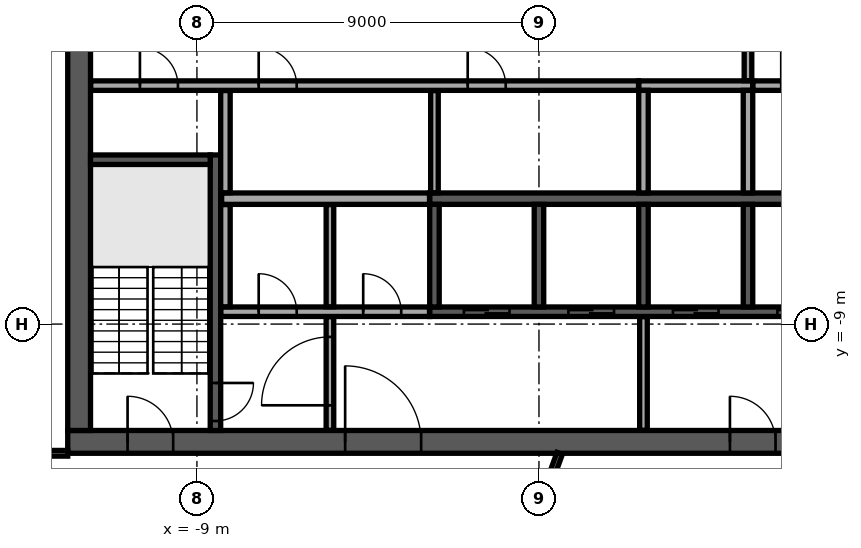
"""IFC4 building model, lengths in metres.
Left out: names, types, materials, properties, quantities, classifications, styles, units other than length and angle.
Written with IfcOpenShell. Run it as: python <this file> out.ifc"""

import sys

from ifc_helpers import new_model, si_unit, direction, frame, frame_2d, origin, place, context, subcontext, project, spatial, rectangle, extrude, element, fill, save


model = new_model("IFC4")
c1 = context("Model", 3, precision=1e-05, world=origin(), true_north=direction((0.0, 1.0)))
c2 = subcontext(c1, "Body", "Model", "MODEL_VIEW")
j1 = project(units=[si_unit("LENGTHUNIT", "METRE"), si_unit("PLANEANGLEUNIT", "RADIAN")], contexts=[c1])
p1 = place(None, origin())
s1 = spatial("IfcSite", under=j1, at=p1, CompositionType="ELEMENT")
p2 = place(p1, origin())
s2 = spatial("IfcBuilding", under=s1, at=p2, CompositionType="ELEMENT")
p3 = place(p2, frame((0.0, 0.0, 304.5)))
s3 = spatial("IfcBuildingStorey", under=s2, at=p3, CompositionType="ELEMENT", Elevation=304.5)
p4 = place(p3, frame((-12.4, -12.1, 0.0), z_axis=(0.0, 0.0, 1.0), x_axis=(1.0, 0.0, 0.0)))
e1 = element("IfcWall", 1, at=p4, inside=s3, PredefinedType="SHEAR", context=c2, shape_type="SweptSolid", body=[
    extrude(rectangle(XDim=24.8, YDim=0.6, at=frame_2d((12.4, 0.0))), origin(), (0.0, 0.0, 1.0), 3.65),
])
p5 = place(p4, frame((7.3, 0.0, 0.0)))
e2 = element("IfcOpeningElement", 2, at=p5, cuts=e1, PredefinedType="OPENING", context=c2, shape_type="SweptSolid", body=[
    extrude(rectangle(XDim=2.0, YDim=2.1, at=frame_2d((1.0, 1.05))), frame((0.0, 0.31, 0.0), z_axis=(0.0, -1.0, 0.0), x_axis=(1.0, 0.0, 0.0)), (0.0, 0.0, 1.0), 0.62),
])
p6 = place(p4, frame((17.425, 0.0, 0.0)))
e3 = element("IfcOpeningElement", 3, at=p6, cuts=e1, PredefinedType="OPENING", context=c2, shape_type="SweptSolid", body=[
    extrude(rectangle(XDim=1.2, YDim=2.1, at=frame_2d((0.6, 1.05))), frame((0.0, 0.31, 0.0), z_axis=(0.0, -1.0, 0.0), x_axis=(1.0, 0.0, 0.0)), (0.0, 0.0, 1.0), 0.62),
])
p7 = place(p4, frame((1.575, 0.0, 0.0)))
e4 = element("IfcOpeningElement", 4, at=p7, cuts=e1, PredefinedType="OPENING", context=c2, shape_type="SweptSolid", body=[
    extrude(rectangle(XDim=1.2, YDim=2.1, at=frame_2d((0.6, 1.05))), frame((0.0, 0.31, 0.0), z_axis=(0.0, -1.0, 0.0), x_axis=(1.0, 0.0, 0.0)), (0.0, 0.0, 1.0), 0.62),
])
p8 = place(p4, frame((22.025, 0.0, 0.0)))
e5 = element("IfcOpeningElement", 5, at=p8, cuts=e1, PredefinedType="OPENING", context=c2, shape_type="SweptSolid", body=[
    extrude(rectangle(XDim=1.2, YDim=2.1, at=frame_2d((0.6, 1.05))), frame((0.0, 0.31, 0.0), z_axis=(0.0, -1.0, 0.0), x_axis=(1.0, 0.0, 0.0)), (0.0, 0.0, 1.0), 0.62),
])
p9 = place(p3, frame((-12.1, -11.8, 0.0), z_axis=(0.0, 0.0, 1.0), x_axis=(0.0, 1.0, 0.0)))
e6 = element("IfcWall", 6, at=p9, inside=s3, PredefinedType="SHEAR", context=c2, shape_type="SweptSolid", body=[
    extrude(rectangle(XDim=23.6, YDim=0.6, at=frame_2d((11.8, 0.0))), origin(), (0.0, 0.0, 1.0), 3.65),
])
p10 = place(p9, frame((10.6, 0.0, 0.0)))
e7 = element("IfcOpeningElement", 7, at=p10, cuts=e6, PredefinedType="OPENING", context=c2, shape_type="SweptSolid", body=[
    extrude(rectangle(XDim=2.4, YDim=2.4, at=frame_2d((1.2, 1.2))), frame((0.0, 0.31, 0.0), z_axis=(0.0, -1.0, 0.0), x_axis=(1.0, 0.0, 0.0)), (0.0, 0.0, 1.0), 0.62),
])
p11 = place(p3, frame((-2.875, -5.7, 0.0), z_axis=(0.0, 0.0, 1.0), x_axis=(1.0, 0.0, 0.0)))
e8 = element("IfcWall", 8, at=p11, inside=s3, PredefinedType="SOLIDWALL", context=c2, shape_type="SweptSolid", body=[
    extrude(rectangle(XDim=11.25, YDim=0.3, at=frame_2d((5.625, 0.0))), origin(), (0.0, 0.0, 1.0), 3.65),
])
p12 = place(p3, frame((2.625, -2.725, 0.0), z_axis=(0.0, 0.0, 1.0), x_axis=(1.0, 0.0, 0.0)))
e9 = element("IfcWall", 9, at=p12, inside=s3, PredefinedType="SOLIDWALL", context=c2, shape_type="SweptSolid", body=[
    extrude(rectangle(XDim=3.0, YDim=0.25, at=frame_2d((1.5, 0.0))), origin(), (0.0, 0.0, 1.0), 3.65),
])
for number, where, z_axis, x_axis in (
    (10, (2.75, -5.55, 0.0), (0.0, 0.0, 1.0), (0.0, 1.0, 0.0)),
    (11, (5.5, -5.55, 0.0), (0.0, 0.0, 1.0), (0.0, 1.0, 0.0)),
):
    element("IfcWall", number, at=place(p3, frame(where, z_axis=z_axis, x_axis=x_axis)), inside=s3, PredefinedType="SOLIDWALL", context=c2, shape_type="SweptSolid", body=[
        extrude(rectangle(XDim=2.7, YDim=0.25, at=frame_2d((1.35, 0.0))), origin(), (0.0, 0.0, 1.0), 3.65),
    ])
p13 = place(p3, frame((-2.875, -8.675, 0.0), z_axis=(0.0, 0.0, 1.0), x_axis=(1.0, 0.0, 0.0)))
e12 = element("IfcWall", 12, at=p13, inside=s3, PredefinedType="SOLIDWALL", context=c2, shape_type="SweptSolid", body=[
    extrude(rectangle(XDim=11.25, YDim=0.25, at=frame_2d((5.625, 0.0))), origin(), (0.0, 0.0, 1.0), 3.65),
])
p14 = place(p13, frame((0.9, 0.0, 0.0)))
e13 = element("IfcOpeningElement", 13, at=p14, cuts=e12, PredefinedType="OPENING", context=c2, shape_type="SweptSolid", body=[
    extrude(rectangle(XDim=1.2, YDim=2.1, at=frame_2d((0.6, 1.05))), frame((0.0, 0.135, 0.0), z_axis=(0.0, -1.0, 0.0), x_axis=(1.0, 0.0, 0.0)), (0.0, 0.0, 1.0), 0.27),
])
p15 = place(p13, frame((3.65, 0.0, 0.0)))
e14 = element("IfcOpeningElement", 14, at=p15, cuts=e12, PredefinedType="OPENING", context=c2, shape_type="SweptSolid", body=[
    extrude(rectangle(XDim=1.2, YDim=2.1, at=frame_2d((0.6, 1.05))), frame((0.0, 0.135, 0.0), z_axis=(0.0, -1.0, 0.0), x_axis=(1.0, 0.0, 0.0)), (0.0, 0.0, 1.0), 0.27),
])
p16 = place(p13, frame((6.4, 0.0, 0.0)))
e15 = element("IfcOpeningElement", 15, at=p16, cuts=e12, PredefinedType="OPENING", context=c2, shape_type="SweptSolid", body=[
    extrude(rectangle(XDim=1.2, YDim=2.1, at=frame_2d((0.6, 1.05))), frame((0.0, 0.135, 0.0), z_axis=(0.0, -1.0, 0.0), x_axis=(1.0, 0.0, 0.0)), (0.0, 0.0, 1.0), 0.27),
])
p17 = place(p13, frame((9.15, 0.0, 0.0)))
e16 = element("IfcOpeningElement", 16, at=p17, cuts=e12, PredefinedType="OPENING", context=c2, shape_type="SweptSolid", body=[
    extrude(rectangle(XDim=1.2, YDim=2.1, at=frame_2d((0.6, 1.05))), frame((0.0, 0.135, 0.0), z_axis=(0.0, -1.0, 0.0), x_axis=(1.0, 0.0, 0.0)), (0.0, 0.0, 1.0), 0.27),
])
for number, where, z_axis, x_axis in (
    (17, (-2.75, -8.55, 0.0), (0.0, 0.0, 1.0), (0.0, 1.0, 0.0)),
    (18, (0.0, -8.55, 0.0), (0.0, 0.0, 1.0), (0.0, 1.0, 0.0)),
    (19, (2.75, -8.55, 0.0), (0.0, 0.0, 1.0), (0.0, 1.0, 0.0)),
    (20, (5.5, -8.55, 0.0), (0.0, 0.0, 1.0), (0.0, 1.0, 0.0)),
):
    element("IfcWall", number, at=place(p3, frame(where, z_axis=z_axis, x_axis=x_axis)), inside=s3, PredefinedType="SOLIDWALL", context=c2, shape_type="SweptSolid", body=[
        extrude(rectangle(XDim=2.7, YDim=0.25, at=frame_2d((1.35, 0.0))), origin(), (0.0, 0.0, 1.0), 3.65),
    ])
p18 = place(p3, frame((-8.512, -4.55, 0.0), z_axis=(0.0, 0.0, 1.0), x_axis=(0.0, -1.0, 0.0)))
e21 = element("IfcWall", 21, at=p18, inside=s3, PredefinedType="SOLIDWALL", context=c2, shape_type="SweptSolid", body=[
    extrude(rectangle(XDim=7.25, YDim=0.275, at=frame_2d((3.625, 0.0))), origin(), (0.0, 0.0, 1.0), 3.65),
])
p19 = place(p18, frame((6.0, 0.0, 0.0)))
e22 = element("IfcOpeningElement", 22, at=p19, cuts=e21, PredefinedType="OPENING", context=c2, shape_type="SweptSolid", body=[
    extrude(rectangle(XDim=1.0, YDim=2.1, at=frame_2d((0.5, 1.05))), frame((0.0, 0.147, 0.0), z_axis=(0.0, -1.0, 0.0), x_axis=(1.0, 0.0, 0.0)), (0.0, 0.0, 1.0), 0.295),
])
p20 = place(p3, frame((-8.65, -4.675, 0.0), z_axis=(0.0, 0.0, 1.0), x_axis=(-1.0, 0.0, 0.0)))
e23 = element("IfcWall", 23, at=p20, inside=s3, PredefinedType="SOLIDWALL", context=c2, shape_type="SweptSolid", body=[
    extrude(rectangle(XDim=3.15, YDim=0.25, at=frame_2d((1.575, 0.0))), origin(), (0.0, 0.0, 1.0), 3.65),
])
p21 = place(p3, frame((-5.5, -11.795, 0.0), z_axis=(0.0, 0.0, 1.0), x_axis=(0.0, 1.0, 0.0)))
e24 = element("IfcWall", 24, at=p21, inside=s3, PredefinedType="PARTITIONING", context=c2, shape_type="SweptSolid", body=[
    extrude(rectangle(XDim=2.99, YDim=0.2, at=frame_2d((1.495, 0.0))), origin(), (0.0, 0.0, 1.0), 3.65),
])
p22 = place(p21, frame((0.657, 0.0, 0.0)))
e25 = element("IfcOpeningElement", 25, at=p22, cuts=e24, PredefinedType="OPENING", context=c2, shape_type="SweptSolid", body=[
    extrude(rectangle(XDim=1.8, YDim=2.1, at=frame_2d((0.9, 1.05))), frame((0.0, 0.11, 0.0), z_axis=(0.0, -1.0, 0.0), x_axis=(1.0, 0.0, 0.0)), (0.0, 0.0, 1.0), 0.22),
])
p23 = place(p3, frame((2.75, -11.795, 0.0), z_axis=(0.0, 0.0, 1.0), x_axis=(0.0, 1.0, 0.0)))
e26 = element("IfcWall", 26, at=p23, inside=s3, PredefinedType="PARTITIONING", context=c2, shape_type="SweptSolid", body=[
    extrude(rectangle(XDim=2.99, YDim=0.2, at=frame_2d((1.495, 0.0))), origin(), (0.0, 0.0, 1.0), 3.65),
])
p24 = place(p3, frame((-8.37, -8.675, 0.0), z_axis=(0.0, 0.0, 1.0), x_axis=(1.0, 0.0, 0.0)))
e27 = element("IfcWall", 27, at=p24, inside=s3, PredefinedType="PARTITIONING", context=c2, shape_type="SweptSolid", body=[
    extrude(rectangle(XDim=5.49, YDim=0.25, at=frame_2d((2.745, 0.0))), origin(), (0.0, 0.0, 1.0), 3.65),
])
p25 = place(p24, frame((0.995, 0.0, 0.0)))
e28 = element("IfcOpeningElement", 28, at=p25, cuts=e27, PredefinedType="OPENING", context=c2, shape_type="SweptSolid", body=[
    extrude(rectangle(XDim=1.0, YDim=2.1, at=frame_2d((0.5, 1.05))), frame((0.0, 0.135, 0.0), z_axis=(0.0, -1.0, 0.0), x_axis=(1.0, 0.0, 0.0)), (0.0, 0.0, 1.0), 0.27),
])
p26 = place(p24, frame((3.745, 0.0, 0.0)))
e29 = element("IfcOpeningElement", 29, at=p26, cuts=e27, PredefinedType="OPENING", context=c2, shape_type="SweptSolid", body=[
    extrude(rectangle(XDim=1.0, YDim=2.1, at=frame_2d((0.5, 1.05))), frame((0.0, 0.135, 0.0), z_axis=(0.0, -1.0, 0.0), x_axis=(1.0, 0.0, 0.0)), (0.0, 0.0, 1.0), 0.27),
])
p27 = place(p3, frame((-8.25, -8.545, 0.0), z_axis=(0.0, 0.0, 1.0), x_axis=(0.0, 1.0, 0.0)))
e30 = element("IfcWall", 30, at=p27, inside=s3, PredefinedType="PARTITIONING", context=c2, shape_type="SweptSolid", body=[
    extrude(rectangle(XDim=2.69, YDim=0.25, at=frame_2d((1.345, 0.0))), origin(), (0.0, 0.0, 1.0), 3.65),
])
p28 = place(p3, frame((-5.5, -8.545, 0.0), z_axis=(0.0, 0.0, 1.0), x_axis=(0.0, 1.0, 0.0)))
e31 = element("IfcWall", 31, at=p28, inside=s3, PredefinedType="PARTITIONING", context=c2, shape_type="SweptSolid", body=[
    extrude(rectangle(XDim=2.69, YDim=0.2, at=frame_2d((1.345, 0.0))), origin(), (0.0, 0.0, 1.0), 3.65),
])
p29 = place(p3, frame((-8.35, -5.7, 0.0), z_axis=(0.0, 0.0, 1.0), x_axis=(1.0, 0.0, 0.0)))
e32 = element("IfcWall", 32, at=p29, inside=s3, PredefinedType="PARTITIONING", context=c2, shape_type="SweptSolid", body=[
    extrude(rectangle(XDim=5.47, YDim=0.3, at=frame_2d((2.735, 0.0))), origin(), (0.0, 0.0, 1.0), 3.65),
])
p30 = place(p3, frame((-8.25, -5.545, 0.0), z_axis=(0.0, 0.0, 1.0), x_axis=(0.0, 1.0, 0.0)))
e33 = element("IfcWall", 33, at=p30, inside=s3, PredefinedType="PARTITIONING", context=c2, shape_type="SweptSolid", body=[
    extrude(rectangle(XDim=2.69, YDim=0.25, at=frame_2d((1.345, 0.0))), origin(), (0.0, 0.0, 1.0), 3.65),
])
p31 = place(p3, frame((-2.75, -5.545, 0.0), z_axis=(0.0, 0.0, 1.0), x_axis=(0.0, 1.0, 0.0)))
e34 = element("IfcWall", 34, at=p31, inside=s3, PredefinedType="PARTITIONING", context=c2, shape_type="SweptSolid", body=[
    extrude(rectangle(XDim=2.69, YDim=0.2, at=frame_2d((1.345, 0.0))), origin(), (0.0, 0.0, 1.0), 3.65),
])
p32 = place(p3, frame((-11.795, -2.725, 0.0), z_axis=(0.0, 0.0, 1.0), x_axis=(1.0, 0.0, 0.0)))
e35 = element("IfcWall", 35, at=p32, inside=s3, PredefinedType="PARTITIONING", context=c2, shape_type="SweptSolid", body=[
    extrude(rectangle(XDim=14.415, YDim=0.25, at=frame_2d((7.208, 0.0))), origin(), (0.0, 0.0, 1.0), 3.65),
])
p33 = place(p32, frame((1.295, 0.0, 0.0)))
e36 = element("IfcOpeningElement", 36, at=p33, cuts=e35, PredefinedType="OPENING", context=c2, shape_type="SweptSolid", body=[
    extrude(rectangle(XDim=1.0, YDim=2.1, at=frame_2d((0.5, 1.05))), frame((0.0, 0.135, 0.0), z_axis=(0.0, -1.0, 0.0), x_axis=(1.0, 0.0, 0.0)), (0.0, 0.0, 1.0), 0.27),
])
p34 = place(p32, frame((4.42, 0.0, 0.0)))
e37 = element("IfcOpeningElement", 37, at=p34, cuts=e35, PredefinedType="OPENING", context=c2, shape_type="SweptSolid", body=[
    extrude(rectangle(XDim=1.0, YDim=2.1, at=frame_2d((0.5, 1.05))), frame((0.0, 0.135, 0.0), z_axis=(0.0, -1.0, 0.0), x_axis=(1.0, 0.0, 0.0)), (0.0, 0.0, 1.0), 0.27),
])
p35 = place(p32, frame((9.92, 0.0, 0.0)))
e38 = element("IfcOpeningElement", 38, at=p35, cuts=e35, PredefinedType="OPENING", context=c2, shape_type="SweptSolid", body=[
    extrude(rectangle(XDim=1.0, YDim=2.1, at=frame_2d((0.5, 1.05))), frame((0.0, 0.135, 0.0), z_axis=(0.0, -1.0, 0.0), x_axis=(1.0, 0.0, 0.0)), (0.0, 0.0, 1.0), 0.27),
])
p36 = place(p3, frame((5.63, -2.725, 0.0), z_axis=(0.0, 0.0, 1.0), x_axis=(1.0, 0.0, 0.0)))
e39 = element("IfcWall", 39, at=p36, inside=s3, PredefinedType="PARTITIONING", context=c2, shape_type="SweptSolid", body=[
    extrude(rectangle(XDim=6.165, YDim=0.25, at=frame_2d((3.083, 0.0))), origin(), (0.0, 0.0, 1.0), 3.65),
])
p37 = place(p36, frame((0.745, 0.0, 0.0)))
e40 = element("IfcOpeningElement", 40, at=p37, cuts=e39, PredefinedType="OPENING", context=c2, shape_type="SweptSolid", body=[
    extrude(rectangle(XDim=1.0, YDim=2.1, at=frame_2d((0.5, 1.05))), frame((0.0, 0.135, 0.0), z_axis=(0.0, -1.0, 0.0), x_axis=(1.0, 0.0, 0.0)), (0.0, 0.0, 1.0), 0.27),
])
p38 = place(p36, frame((3.92, 0.0, 0.0)))
e41 = element("IfcOpeningElement", 41, at=p38, cuts=e39, PredefinedType="OPENING", context=c2, shape_type="SweptSolid", body=[
    extrude(rectangle(XDim=0.9, YDim=2.1, at=frame_2d((0.45, 1.05))), frame((0.0, 0.135, 0.0), z_axis=(0.0, -1.0, 0.0), x_axis=(1.0, 0.0, 0.0)), (0.0, 0.0, 1.0), 0.27),
])
p39 = place(p3, frame((5.5, -2.595, 0.0), z_axis=(0.0, 0.0, 1.0), x_axis=(0.0, 1.0, 0.0)))
e42 = element("IfcWall", 42, at=p39, inside=s3, PredefinedType="PARTITIONING", context=c2, shape_type="SweptSolid", body=[
    extrude(rectangle(XDim=5.19, YDim=0.2, at=frame_2d((2.595, 0.0))), origin(), (0.0, 0.0, 1.0), 3.65),
])
p40 = place(p39, frame((1.395, 0.0, 0.0)))
e43 = element("IfcOpeningElement", 43, at=p40, cuts=e42, PredefinedType="OPENING", context=c2, shape_type="SweptSolid", body=[
    extrude(rectangle(XDim=2.4, YDim=2.4, at=frame_2d((1.2, 1.2))), frame((0.0, 0.11, 0.0), z_axis=(0.0, -1.0, 0.0), x_axis=(1.0, 0.0, 0.0)), (0.0, 0.0, 1.0), 0.22),
])
p41 = place(p3, frame((-24.679, -11.445, 0.0), z_axis=(0.0, 0.0, 1.0), x_axis=(0.939685239834, -0.342040421645, 0.0)))
e44 = element("IfcWall", 44, at=p41, inside=s3, PredefinedType="PARTITIONING", context=c2, shape_type="SweptSolid", body=[
    extrude(rectangle(XDim=38.628, YDim=0.15, at=frame_2d((19.314, 0.0))), origin(), (0.0, 0.0, 1.0), 3.25),
])
p42 = place(p41, frame((8.764, 0.0, 0.0)))
e45 = element("IfcOpeningElement", 45, at=p42, cuts=e44, PredefinedType="OPENING", context=c2, shape_type="SweptSolid", body=[
    extrude(rectangle(XDim=1.0, YDim=2.1, at=frame_2d((0.5, 1.05))), frame((0.0, 0.085, 0.0), z_axis=(0.0, -1.0, 0.0), x_axis=(1.0, 0.0, 0.0)), (0.0, 0.0, 1.0), 0.17),
])
p43 = place(p41, frame((19.503, 0.0, 0.0)))
e46 = element("IfcOpeningElement", 46, at=p43, cuts=e44, PredefinedType="OPENING", context=c2, shape_type="SweptSolid", body=[
    extrude(rectangle(XDim=1.0, YDim=2.1, at=frame_2d((0.5, 1.05))), frame((0.0, 0.085, 0.0), z_axis=(0.0, -1.0, 0.0), x_axis=(1.0, 0.0, 0.0)), (0.0, 0.0, 1.0), 0.17),
])
p44 = place(p41, frame((29.163, 0.0, 0.0)))
e47 = element("IfcOpeningElement", 47, at=p44, cuts=e44, PredefinedType="OPENING", context=c2, shape_type="SweptSolid", body=[
    extrude(rectangle(XDim=1.0, YDim=2.1, at=frame_2d((0.5, 1.05))), frame((0.0, 0.085, 0.0), z_axis=(0.0, -1.0, 0.0), x_axis=(1.0, 0.0, 0.0)), (0.0, 0.0, 1.0), 0.17),
])
p45 = place(p3, frame((-14.604, -12.558, 0.0), z_axis=(0.0, 0.0, 1.0), x_axis=(0.93968732693, -0.342034687724, 0.0)))
e48 = element("IfcWall", 48, at=p45, inside=s3, PredefinedType="PARTITIONING", context=c2, shape_type="SweptSolid", body=[
    extrude(rectangle(XDim=14.182, YDim=0.15, at=frame_2d((7.091, 0.0))), origin(), (0.0, 0.0, 1.0), 3.25),
])
p46 = place(p3, frame((-14.576, -12.4, 0.0), z_axis=(0.0, 0.0, 1.0), x_axis=(1.0, 0.0, 0.0)))
e49 = element("IfcWall", 49, at=p46, inside=s3, PredefinedType="PARTITIONING", context=c2, shape_type="SweptSolid", body=[
    extrude(rectangle(XDim=2.176, YDim=0.15, at=frame_2d((1.088, 0.0))), origin(), (0.0, 0.0, 1.0), 3.13),
])
p47 = place(p3, frame((-1.251, -17.338, 0.0), z_axis=(0.0, 0.0, 1.0), x_axis=(0.341963126629, 0.939713371207, 0.0)))
e50 = element("IfcWall", 50, at=p47, inside=s3, PredefinedType="PARTITIONING", context=c2, shape_type="SweptSolid", body=[
    extrude(rectangle(XDim=5.255, YDim=0.15, at=frame_2d((2.628, 0.0))), origin(), (0.0, 0.0, 1.0), 3.65),
])
p48 = place(p47, frame((2.3, 0.0, 0.0)))
e51 = element("IfcOpeningElement", 51, at=p48, cuts=e50, PredefinedType="OPENING", context=c2, shape_type="SweptSolid", body=[
    extrude(rectangle(XDim=1.0, YDim=2.1, at=frame_2d((0.5, 1.05))), frame((0.0, 0.085, 0.0), z_axis=(0.0, -1.0, 0.0), x_axis=(1.0, 0.0, 0.0)), (0.0, 0.0, 1.0), 0.17),
])
p49 = place(p5, origin())
e52 = element("IfcDoor", 52, at=p49, inside=s3, OperationType="SINGLE_SWING_LEFT", PredefinedType="DOOR", context=c2, shape_type="SweptSolid", body=[
    extrude(rectangle(XDim=2.0, YDim=2.1, at=frame_2d((1.0, 1.05))), frame((0.0, 0.025, 0.0), z_axis=(0.0, -1.0, 0.0), x_axis=(1.0, 0.0, 0.0)), (0.0, 0.0, 1.0), 0.05),
])
fill(e2, e52)
p50 = place(p6, origin())
e53 = element("IfcDoor", 53, at=p50, inside=s3, OperationType="SINGLE_SWING_LEFT", PredefinedType="DOOR", context=c2, shape_type="SweptSolid", body=[
    extrude(rectangle(XDim=1.2, YDim=2.1, at=frame_2d((0.6, 1.05))), frame((0.0, 0.025, 0.0), z_axis=(0.0, -1.0, 0.0), x_axis=(1.0, 0.0, 0.0)), (0.0, 0.0, 1.0), 0.05),
])
fill(e3, e53)
p51 = place(p7, origin())
e54 = element("IfcDoor", 54, at=p51, inside=s3, OperationType="SINGLE_SWING_LEFT", PredefinedType="DOOR", context=c2, shape_type="SweptSolid", body=[
    extrude(rectangle(XDim=1.2, YDim=2.1, at=frame_2d((0.6, 1.05))), frame((0.0, 0.025, 0.0), z_axis=(0.0, -1.0, 0.0), x_axis=(1.0, 0.0, 0.0)), (0.0, 0.0, 1.0), 0.05),
])
fill(e4, e54)
p52 = place(p14, origin())
e55 = element("IfcDoor", 55, at=p52, inside=s3, OperationType="DOUBLE_DOOR_SLIDING", PredefinedType="DOOR", context=c2, shape_type="SweptSolid", body=[
    extrude(rectangle(XDim=1.2, YDim=2.1, at=frame_2d((0.6, 1.05))), frame((0.0, 0.025, 0.0), z_axis=(0.0, -1.0, 0.0), x_axis=(1.0, 0.0, 0.0)), (0.0, 0.0, 1.0), 0.05),
])
fill(e13, e55)
p53 = place(p15, origin())
e56 = element("IfcDoor", 56, at=p53, inside=s3, OperationType="DOUBLE_DOOR_SLIDING", PredefinedType="DOOR", context=c2, shape_type="SweptSolid", body=[
    extrude(rectangle(XDim=1.2, YDim=2.1, at=frame_2d((0.6, 1.05))), frame((0.0, 0.025, 0.0), z_axis=(0.0, -1.0, 0.0), x_axis=(1.0, 0.0, 0.0)), (0.0, 0.0, 1.0), 0.05),
])
fill(e14, e56)
p54 = place(p16, origin())
e57 = element("IfcDoor", 57, at=p54, inside=s3, OperationType="DOUBLE_DOOR_SLIDING", PredefinedType="DOOR", context=c2, shape_type="SweptSolid", body=[
    extrude(rectangle(XDim=1.2, YDim=2.1, at=frame_2d((0.6, 1.05))), frame((0.0, 0.025, 0.0), z_axis=(0.0, -1.0, 0.0), x_axis=(1.0, 0.0, 0.0)), (0.0, 0.0, 1.0), 0.05),
])
fill(e15, e57)
p55 = place(p17, origin())
e58 = element("IfcDoor", 58, at=p55, inside=s3, OperationType="DOUBLE_DOOR_SLIDING", PredefinedType="DOOR", context=c2, shape_type="SweptSolid", body=[
    extrude(rectangle(XDim=1.2, YDim=2.1, at=frame_2d((0.6, 1.05))), frame((0.0, 0.025, 0.0), z_axis=(0.0, -1.0, 0.0), x_axis=(1.0, 0.0, 0.0)), (0.0, 0.0, 1.0), 0.05),
])
fill(e16, e58)
p56 = place(p19, origin())
e59 = element("IfcDoor", 59, at=p56, inside=s3, OperationType="SINGLE_SWING_LEFT", PredefinedType="DOOR", context=c2, shape_type="SweptSolid", body=[
    extrude(rectangle(XDim=1.0, YDim=2.1, at=frame_2d((0.5, 1.05))), frame((0.0, 0.025, 0.0), z_axis=(0.0, -1.0, 0.0), x_axis=(1.0, 0.0, 0.0)), (0.0, 0.0, 1.0), 0.05),
])
fill(e22, e59)
p57 = place(p25, origin())
e60 = element("IfcDoor", 60, at=p57, inside=s3, OperationType="SINGLE_SWING_LEFT", PredefinedType="DOOR", context=c2, shape_type="SweptSolid", body=[
    extrude(rectangle(XDim=1.0, YDim=2.1, at=frame_2d((0.5, 1.05))), frame((0.0, 0.025, 0.0), z_axis=(0.0, -1.0, 0.0), x_axis=(1.0, 0.0, 0.0)), (0.0, 0.0, 1.0), 0.05),
])
fill(e28, e60)
p58 = place(p26, origin())
e61 = element("IfcDoor", 61, at=p58, inside=s3, OperationType="SINGLE_SWING_LEFT", PredefinedType="DOOR", context=c2, shape_type="SweptSolid", body=[
    extrude(rectangle(XDim=1.0, YDim=2.1, at=frame_2d((0.5, 1.05))), frame((0.0, 0.025, 0.0), z_axis=(0.0, -1.0, 0.0), x_axis=(1.0, 0.0, 0.0)), (0.0, 0.0, 1.0), 0.05),
])
fill(e29, e61)
p59 = place(p33, origin())
e62 = element("IfcDoor", 62, at=p59, inside=s3, OperationType="SINGLE_SWING_LEFT", PredefinedType="DOOR", context=c2, shape_type="SweptSolid", body=[
    extrude(rectangle(XDim=1.0, YDim=2.1, at=frame_2d((0.5, 1.05))), frame((0.0, 0.025, 0.0), z_axis=(0.0, -1.0, 0.0), x_axis=(1.0, 0.0, 0.0)), (0.0, 0.0, 1.0), 0.05),
])
fill(e36, e62)
p60 = place(p34, origin())
e63 = element("IfcDoor", 63, at=p60, inside=s3, OperationType="SINGLE_SWING_LEFT", PredefinedType="DOOR", context=c2, shape_type="SweptSolid", body=[
    extrude(rectangle(XDim=1.0, YDim=2.1, at=frame_2d((0.5, 1.05))), frame((0.0, 0.025, 0.0), z_axis=(0.0, -1.0, 0.0), x_axis=(1.0, 0.0, 0.0)), (0.0, 0.0, 1.0), 0.05),
])
fill(e37, e63)
p61 = place(p35, origin())
e64 = element("IfcDoor", 64, at=p61, inside=s3, OperationType="SINGLE_SWING_LEFT", PredefinedType="DOOR", context=c2, shape_type="SweptSolid", body=[
    extrude(rectangle(XDim=1.0, YDim=2.1, at=frame_2d((0.5, 1.05))), frame((0.0, 0.025, 0.0), z_axis=(0.0, -1.0, 0.0), x_axis=(1.0, 0.0, 0.0)), (0.0, 0.0, 1.0), 0.05),
])
fill(e38, e64)
p62 = place(p22, origin())
e65 = element("IfcDoor", 65, at=p62, inside=s3, OperationType="SINGLE_SWING_LEFT", PredefinedType="DOOR", context=c2, shape_type="SweptSolid", body=[
    extrude(rectangle(XDim=1.8, YDim=2.1, at=frame_2d((0.9, 1.05))), frame((0.0, 0.025, 0.0), z_axis=(0.0, -1.0, 0.0), x_axis=(1.0, 0.0, 0.0)), (0.0, 0.0, 1.0), 0.05),
])
fill(e25, e65)
save(model, sys.argv[1])
